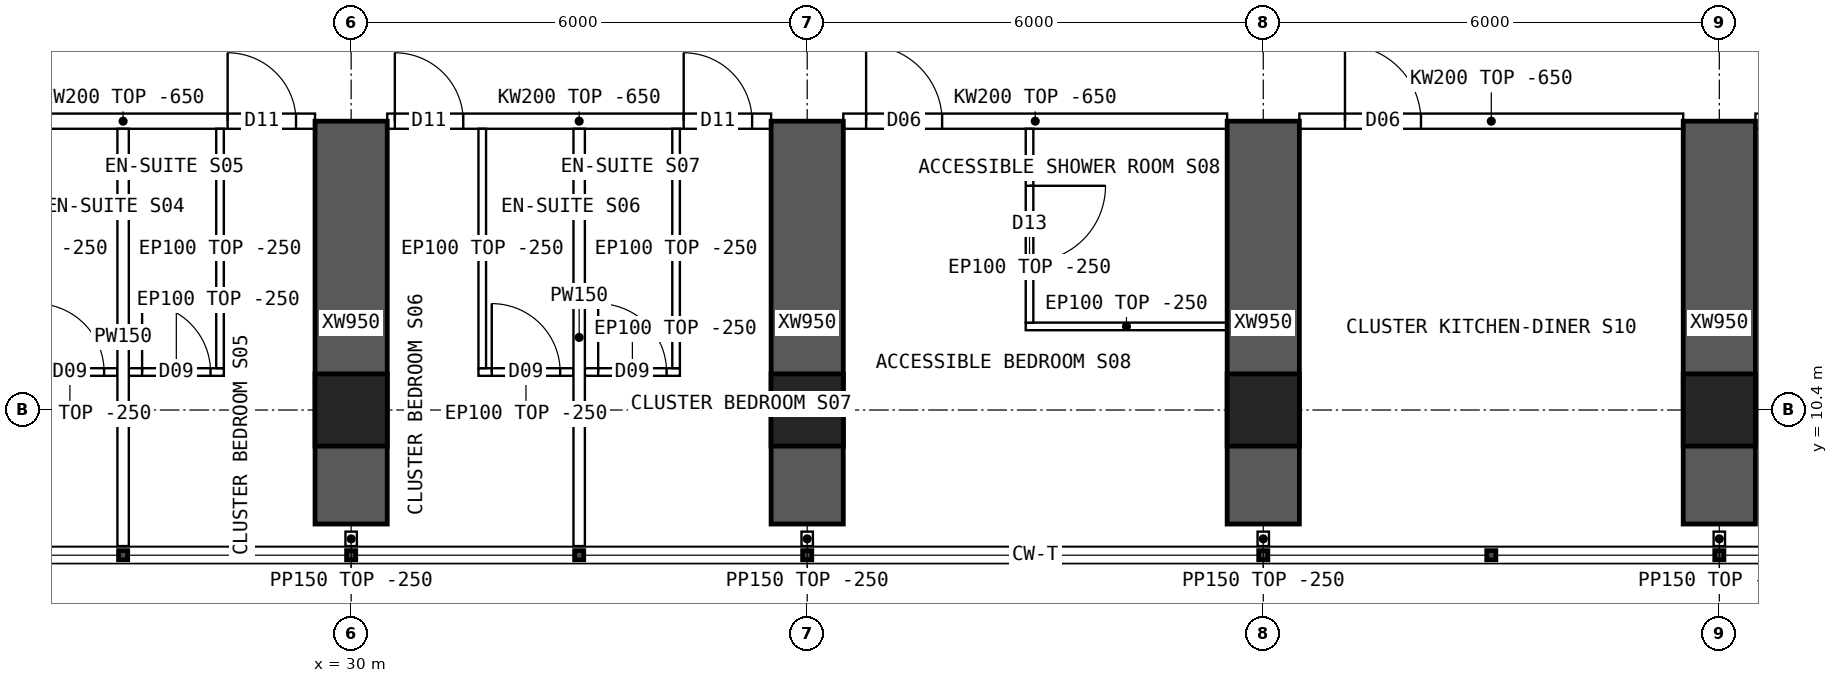
"""IFC4 building model, lengths in metres.
Left out: names, types, materials, properties, quantities, classifications, styles, units other than length and angle.
Written with IfcOpenShell. Run it as: python <this file> out.ifc"""

import sys

from ifc_helpers import new_model, si_unit, direction, frame, frame_2d, origin, origin_2d, place, context, subcontext, project, spatial, polyline, rectangle, hollow_rectangle, outline, extrude, element, fill, save


model = new_model("IFC4")
c1 = context("Model", 3, precision=1e-05, world=origin(), true_north=direction((0.0, 1.0)))
c2 = subcontext(c1, "Body", "Model", "MODEL_VIEW")
j1 = project(units=[si_unit("LENGTHUNIT", "METRE"), si_unit("PLANEANGLEUNIT", "RADIAN")], contexts=[c1])
p1 = place(None, origin())
s1 = spatial("IfcSite", under=j1, at=p1, CompositionType="ELEMENT")
p2 = place(p1, origin())
s2 = spatial("IfcBuilding", under=s1, at=p2, CompositionType="ELEMENT")
p3 = place(p2, frame((0.0, 0.0, 121.9)))
s3 = spatial("IfcBuildingStorey", under=s2, at=p3, CompositionType="ELEMENT", Elevation=121.9)
for number, where, z_axis, x_axis in (
    (1, (30.0, 10.4, 0.0), (0.0, 0.0, 1.0), (1.0, 0.0, 0.0)),
    (2, (36.0, 10.4, 0.0), (0.0, 0.0, 1.0), (1.0, 0.0, 0.0)),
    (3, (42.0, 10.4, 0.0), (0.0, 0.0, 1.0), (1.0, 0.0, 0.0)),
    (4, (48.0, 10.4, 0.0), (0.0, 0.0, 1.0), (1.0, 0.0, 0.0)),
):
    element("IfcColumn", number, at=place(p3, frame(where, z_axis=z_axis, x_axis=x_axis)), inside=s3, PredefinedType="COLUMN", context=c2, shape_type="SweptSolid", body=[
        extrude(hollow_rectangle(XDim=0.95, YDim=0.95, WallThickness=0.095, at=origin_2d()), origin(), (0.0, 0.0, 1.0), 3.75),
    ])
for number, where, z_axis, x_axis in (
    (5, (30.0, 8.9, 0.0), (0.0, 0.0, 1.0), (0.0, 1.0, 0.0)),
    (6, (36.0, 8.9, 0.0), (0.0, 0.0, 1.0), (0.0, 1.0, 0.0)),
    (7, (42.0, 8.9, 0.0), (0.0, 0.0, 1.0), (0.0, 1.0, 0.0)),
    (8, (48.0, 8.9, 0.0), (0.0, 0.0, 1.0), (0.0, 1.0, 0.0)),
):
    element("IfcWall", number, at=place(p3, frame(where, z_axis=z_axis, x_axis=x_axis)), inside=s3, PredefinedType="SHEAR", context=c2, shape_type="SweptSolid", body=[
        extrude(rectangle(XDim=5.3, YDim=0.95, at=frame_2d((2.65, 0.0))), origin(), (0.0, 0.0, 1.0), 3.75),
    ])
p4 = place(p3, frame((24.475, 14.2, 0.0), z_axis=(0.0, 0.0, 1.0), x_axis=(1.0, 0.0, 0.0)))
e9 = element("IfcWall", 9, at=p4, inside=s3, PredefinedType="SOLIDWALL", context=c2, shape_type="SweptSolid", body=[
    extrude(outline(polyline([(0.0, 0.0), (5.05, 0.0), (5.05, 3.1), (0.0, 3.1), (0.0, 0.0)])), frame((0.0, 0.1, 0.0), z_axis=(0.0, -1.0, 0.0), x_axis=(1.0, 0.0, 0.0)), (0.0, 0.0, 1.0), 0.2),
])
p5 = place(p4, frame((0.1, 0.0, 0.0)))
e10 = element("IfcOpeningElement", 10, at=p5, cuts=e9, PredefinedType="OPENING", context=c2, shape_type="SweptSolid", body=[
    extrude(rectangle(XDim=0.9, YDim=2.1, at=frame_2d((0.45, 1.05))), frame((0.0, 0.11, 0.0), z_axis=(0.0, -1.0, 0.0), x_axis=(1.0, 0.0, 0.0)), (0.0, 0.0, 1.0), 0.22),
])
p6 = place(p4, frame((3.9, 0.0, 0.0)))
e11 = element("IfcOpeningElement", 11, at=p6, cuts=e9, PredefinedType="OPENING", context=c2, shape_type="SweptSolid", body=[
    extrude(rectangle(XDim=0.9, YDim=2.1, at=frame_2d((0.45, 1.05))), frame((0.0, 0.11, 0.0), z_axis=(0.0, -1.0, 0.0), x_axis=(1.0, 0.0, 0.0)), (0.0, 0.0, 1.0), 0.22),
])
p7 = place(p3, frame((30.475, 14.2, 0.0), z_axis=(0.0, 0.0, 1.0), x_axis=(1.0, 0.0, 0.0)))
e12 = element("IfcWall", 12, at=p7, inside=s3, PredefinedType="SOLIDWALL", context=c2, shape_type="SweptSolid", body=[
    extrude(outline(polyline([(0.0, 0.0), (5.05, 0.0), (5.05, 3.1), (0.0, 3.1), (0.0, 0.0)])), frame((0.0, 0.1, 0.0), z_axis=(0.0, -1.0, 0.0), x_axis=(1.0, 0.0, 0.0)), (0.0, 0.0, 1.0), 0.2),
])
p8 = place(p7, frame((0.1, 0.0, 0.0)))
e13 = element("IfcOpeningElement", 13, at=p8, cuts=e12, PredefinedType="OPENING", context=c2, shape_type="SweptSolid", body=[
    extrude(rectangle(XDim=0.9, YDim=2.1, at=frame_2d((0.45, 1.05))), frame((0.0, 0.11, 0.0), z_axis=(0.0, -1.0, 0.0), x_axis=(1.0, 0.0, 0.0)), (0.0, 0.0, 1.0), 0.22),
])
p9 = place(p7, frame((3.9, 0.0, 0.0)))
e14 = element("IfcOpeningElement", 14, at=p9, cuts=e12, PredefinedType="OPENING", context=c2, shape_type="SweptSolid", body=[
    extrude(rectangle(XDim=0.9, YDim=2.1, at=frame_2d((0.45, 1.05))), frame((0.0, 0.11, 0.0), z_axis=(0.0, -1.0, 0.0), x_axis=(1.0, 0.0, 0.0)), (0.0, 0.0, 1.0), 0.22),
])
p10 = place(p3, frame((36.475, 14.2, 0.0), z_axis=(0.0, 0.0, 1.0), x_axis=(1.0, 0.0, 0.0)))
e15 = element("IfcWall", 15, at=p10, inside=s3, PredefinedType="SOLIDWALL", context=c2, shape_type="SweptSolid", body=[
    extrude(outline(polyline([(0.0, 0.0), (5.05, 0.0), (5.05, 3.1), (0.0, 3.1), (0.0, 0.0)])), frame((0.0, 0.1, 0.0), z_axis=(0.0, -1.0, 0.0), x_axis=(1.0, 0.0, 0.0)), (0.0, 0.0, 1.0), 0.2),
])
p11 = place(p10, frame((0.3, 0.0, 0.0)))
e16 = element("IfcOpeningElement", 16, at=p11, cuts=e15, PredefinedType="OPENING", context=c2, shape_type="SweptSolid", body=[
    extrude(rectangle(XDim=1.0, YDim=2.1, at=frame_2d((0.5, 1.05))), frame((0.0, 0.11, 0.0), z_axis=(0.0, -1.0, 0.0), x_axis=(1.0, 0.0, 0.0)), (0.0, 0.0, 1.0), 0.22),
])
p12 = place(p3, frame((42.475, 14.2, 0.0), z_axis=(0.0, 0.0, 1.0), x_axis=(1.0, 0.0, 0.0)))
e17 = element("IfcWall", 17, at=p12, inside=s3, PredefinedType="SOLIDWALL", context=c2, shape_type="SweptSolid", body=[
    extrude(outline(polyline([(0.0, 0.0), (5.05, 0.0), (5.05, 3.1), (0.0, 3.1), (0.0, 0.0)])), frame((0.0, 0.1, 0.0), z_axis=(0.0, -1.0, 0.0), x_axis=(1.0, 0.0, 0.0)), (0.0, 0.0, 1.0), 0.2),
])
p13 = place(p12, frame((0.6, 0.0, 0.0)))
e18 = element("IfcOpeningElement", 18, at=p13, cuts=e17, PredefinedType="OPENING", context=c2, shape_type="SweptSolid", body=[
    extrude(rectangle(XDim=1.0, YDim=2.1, at=frame_2d((0.5, 1.05))), frame((0.0, 0.11, 0.0), z_axis=(0.0, -1.0, 0.0), x_axis=(1.0, 0.0, 0.0)), (0.0, 0.0, 1.0), 0.22),
])
p14 = place(p3, frame((48.475, 14.2, 0.0), z_axis=(0.0, 0.0, 1.0), x_axis=(1.0, 0.0, 0.0)))
e19 = element("IfcWall", 19, at=p14, inside=s3, PredefinedType="SOLIDWALL", context=c2, shape_type="SweptSolid", body=[
    extrude(outline(polyline([(0.0, 0.0), (5.05, 0.0), (5.05, 3.1), (0.0, 3.1), (0.0, 0.0)])), frame((0.0, 0.1, 0.0), z_axis=(0.0, -1.0, 0.0), x_axis=(1.0, 0.0, 0.0)), (0.0, 0.0, 1.0), 0.2),
])
p15 = place(p14, frame((0.1, 0.0, 0.0)))
e20 = element("IfcOpeningElement", 20, at=p15, cuts=e19, PredefinedType="OPENING", context=c2, shape_type="SweptSolid", body=[
    extrude(rectangle(XDim=0.9, YDim=2.1, at=frame_2d((0.45, 1.05))), frame((0.0, 0.11, 0.0), z_axis=(0.0, -1.0, 0.0), x_axis=(1.0, 0.0, 0.0)), (0.0, 0.0, 1.0), 0.22),
])
p16 = place(p14, frame((3.9, 0.0, 0.0)))
e21 = element("IfcOpeningElement", 21, at=p16, cuts=e19, PredefinedType="OPENING", context=c2, shape_type="SweptSolid", body=[
    extrude(rectangle(XDim=0.9, YDim=2.1, at=frame_2d((0.45, 1.05))), frame((0.0, 0.11, 0.0), z_axis=(0.0, -1.0, 0.0), x_axis=(1.0, 0.0, 0.0)), (0.0, 0.0, 1.0), 0.22),
])
p17 = place(p3, frame((27.0, 8.61, 0.0), z_axis=(0.0, 0.0, 1.0), x_axis=(0.0, 1.0, 0.0)))
e22 = element("IfcWall", 22, at=p17, inside=s3, PredefinedType="PARTITIONING", context=c2, shape_type="SweptSolid", body=[
    extrude(outline(polyline([(0.0, 0.0), (5.49, 0.0), (5.49, 3.1), (5.442, 3.1), (5.44, 3.5), (1.992, 3.5), (1.99, 3.1), (1.592, 3.1), (1.59, 3.5), (0.0, 3.5), (0.0, 0.0)])), frame((0.0, 0.075, 0.0), z_axis=(0.0, -1.0, 0.0), x_axis=(1.0, 0.0, 0.0)), (0.0, 0.0, 1.0), 0.15),
])
p18 = place(p3, frame((26.925, 10.9, 0.0), z_axis=(0.0, 0.0, 1.0), x_axis=(-1.0, 0.0, 0.0)))
e23 = element("IfcWall", 23, at=p18, inside=s3, PredefinedType="PARTITIONING", context=c2, shape_type="SweptSolid", body=[
    extrude(rectangle(XDim=1.25, YDim=0.1, at=frame_2d((0.625, 0.0))), origin(), (0.0, 0.0, 1.0), 3.5),
])
p19 = place(p18, frame((0.175, 0.0, 0.0)))
e24 = element("IfcOpeningElement", 24, at=p19, cuts=e23, PredefinedType="OPENING", context=c2, shape_type="SweptSolid", body=[
    extrude(rectangle(XDim=0.9, YDim=2.1, at=frame_2d((0.45, 1.05))), frame((0.0, 0.06, 0.0), z_axis=(0.0, -1.0, 0.0), x_axis=(1.0, 0.0, 0.0)), (0.0, 0.0, 1.0), 0.12),
])
p20 = place(p3, frame((28.325, 10.9, 0.0), z_axis=(0.0, 0.0, 1.0), x_axis=(-1.0, 0.0, 0.0)))
e25 = element("IfcWall", 25, at=p20, inside=s3, PredefinedType="PARTITIONING", context=c2, shape_type="SweptSolid", body=[
    extrude(rectangle(XDim=1.25, YDim=0.1, at=frame_2d((0.625, 0.0))), origin(), (0.0, 0.0, 1.0), 3.5),
])
p21 = place(p20, frame((0.175, 0.0, 0.0)))
e26 = element("IfcOpeningElement", 26, at=p21, cuts=e25, PredefinedType="OPENING", context=c2, shape_type="SweptSolid", body=[
    extrude(rectangle(XDim=0.9, YDim=2.1, at=frame_2d((0.45, 1.05))), frame((0.0, 0.06, 0.0), z_axis=(0.0, -1.0, 0.0), x_axis=(1.0, 0.0, 0.0)), (0.0, 0.0, 1.0), 0.12),
])
p22 = place(p3, frame((28.275, 10.95, 0.0), z_axis=(0.0, 0.0, 1.0), x_axis=(0.0, 1.0, 0.0)))
e27 = element("IfcWall", 27, at=p22, inside=s3, PredefinedType="PARTITIONING", context=c2, shape_type="SweptSolid", body=[
    extrude(outline(polyline([(0.0, 0.0), (3.15, 0.0), (3.15, 3.1), (3.102, 3.1), (3.1, 3.5), (0.0, 3.5), (0.0, 0.0)])), frame((0.0, 0.05, 0.0), z_axis=(0.0, -1.0, 0.0), x_axis=(1.0, 0.0, 0.0)), (0.0, 0.0, 1.0), 0.1),
])
p23 = place(p3, frame((33.0, 8.61, 0.0), z_axis=(0.0, 0.0, 1.0), x_axis=(0.0, 1.0, 0.0)))
e28 = element("IfcWall", 28, at=p23, inside=s3, PredefinedType="PARTITIONING", context=c2, shape_type="SweptSolid", body=[
    extrude(outline(polyline([(0.0, 0.0), (5.49, 0.0), (5.49, 3.1), (5.442, 3.1), (5.44, 3.5), (1.992, 3.5), (1.99, 3.1), (1.592, 3.1), (1.59, 3.5), (0.0, 3.5), (0.0, 0.0)])), frame((0.0, 0.075, 0.0), z_axis=(0.0, -1.0, 0.0), x_axis=(1.0, 0.0, 0.0)), (0.0, 0.0, 1.0), 0.15),
])
p24 = place(p3, frame((32.925, 10.9, 0.0), z_axis=(0.0, 0.0, 1.0), x_axis=(-1.0, 0.0, 0.0)))
e29 = element("IfcWall", 29, at=p24, inside=s3, PredefinedType="PARTITIONING", context=c2, shape_type="SweptSolid", body=[
    extrude(rectangle(XDim=1.25, YDim=0.1, at=frame_2d((0.625, 0.0))), origin(), (0.0, 0.0, 1.0), 3.5),
])
p25 = place(p24, frame((0.175, 0.0, 0.0)))
e30 = element("IfcOpeningElement", 30, at=p25, cuts=e29, PredefinedType="OPENING", context=c2, shape_type="SweptSolid", body=[
    extrude(rectangle(XDim=0.9, YDim=2.1, at=frame_2d((0.45, 1.05))), frame((0.0, 0.06, 0.0), z_axis=(0.0, -1.0, 0.0), x_axis=(1.0, 0.0, 0.0)), (0.0, 0.0, 1.0), 0.12),
])
p26 = place(p3, frame((31.725, 10.95, 0.0), z_axis=(0.0, 0.0, 1.0), x_axis=(0.0, 1.0, 0.0)))
e31 = element("IfcWall", 31, at=p26, inside=s3, PredefinedType="PARTITIONING", context=c2, shape_type="SweptSolid", body=[
    extrude(outline(polyline([(0.0, 0.0), (3.15, 0.0), (3.15, 3.1), (3.102, 3.1), (3.1, 3.5), (0.0, 3.5), (0.0, 0.0)])), frame((0.0, 0.05, 0.0), z_axis=(0.0, -1.0, 0.0), x_axis=(1.0, 0.0, 0.0)), (0.0, 0.0, 1.0), 0.1),
])
p27 = place(p3, frame((34.325, 10.9, 0.0), z_axis=(0.0, 0.0, 1.0), x_axis=(-1.0, 0.0, 0.0)))
e32 = element("IfcWall", 32, at=p27, inside=s3, PredefinedType="PARTITIONING", context=c2, shape_type="SweptSolid", body=[
    extrude(rectangle(XDim=1.25, YDim=0.1, at=frame_2d((0.625, 0.0))), origin(), (0.0, 0.0, 1.0), 3.5),
])
p28 = place(p27, frame((0.175, 0.0, 0.0)))
e33 = element("IfcOpeningElement", 33, at=p28, cuts=e32, PredefinedType="OPENING", context=c2, shape_type="SweptSolid", body=[
    extrude(rectangle(XDim=0.9, YDim=2.1, at=frame_2d((0.45, 1.05))), frame((0.0, 0.06, 0.0), z_axis=(0.0, -1.0, 0.0), x_axis=(1.0, 0.0, 0.0)), (0.0, 0.0, 1.0), 0.12),
])
p29 = place(p3, frame((34.275, 10.95, 0.0), z_axis=(0.0, 0.0, 1.0), x_axis=(0.0, 1.0, 0.0)))
e34 = element("IfcWall", 34, at=p29, inside=s3, PredefinedType="PARTITIONING", context=c2, shape_type="SweptSolid", body=[
    extrude(outline(polyline([(0.0, 0.0), (3.15, 0.0), (3.15, 3.1), (3.102, 3.1), (3.1, 3.5), (0.0, 3.5), (0.0, 0.0)])), frame((0.0, 0.05, 0.0), z_axis=(0.0, -1.0, 0.0), x_axis=(1.0, 0.0, 0.0)), (0.0, 0.0, 1.0), 0.1),
])
p30 = place(p3, frame((38.875, 11.5, 0.0), z_axis=(0.0, 0.0, 1.0), x_axis=(1.0, 0.0, 0.0)))
e35 = element("IfcWall", 35, at=p30, inside=s3, PredefinedType="PARTITIONING", context=c2, shape_type="SweptSolid", body=[
    extrude(rectangle(XDim=2.65, YDim=0.1, at=frame_2d((1.325, 0.0))), origin(), (0.0, 0.0, 1.0), 3.5),
])
p31 = place(p3, frame((38.925, 11.55, 0.0), z_axis=(0.0, 0.0, 1.0), x_axis=(0.0, 1.0, 0.0)))
e36 = element("IfcWall", 36, at=p31, inside=s3, PredefinedType="PARTITIONING", context=c2, shape_type="SweptSolid", body=[
    extrude(outline(polyline([(0.0, 0.0), (2.55, 0.0), (2.55, 3.1), (2.502, 3.1), (2.5, 3.5), (0.0, 3.5), (0.0, 0.0)])), frame((0.0, 0.05, 0.0), z_axis=(0.0, -1.0, 0.0), x_axis=(1.0, 0.0, 0.0)), (0.0, 0.0, 1.0), 0.1),
])
p32 = place(p31, frame((0.8, 0.0, 0.0)))
e37 = element("IfcOpeningElement", 37, at=p32, cuts=e36, PredefinedType="OPENING", context=c2, shape_type="SweptSolid", body=[
    extrude(rectangle(XDim=1.0, YDim=2.1, at=frame_2d((0.5, 1.05))), frame((0.0, 0.06, 0.0), z_axis=(0.0, -1.0, 0.0), x_axis=(1.0, 0.0, 0.0)), (0.0, 0.0, 1.0), 0.12),
])
for number, where, z_axis, x_axis in (
    (38, (30.0, 8.8, 0.0), (0.0, 0.0, 1.0), (0.0, -1.0, 0.0)),
    (39, (36.0, 8.8, 0.0), (0.0, 0.0, 1.0), (0.0, -1.0, 0.0)),
    (40, (42.0, 8.8, 0.0), (0.0, 0.0, 1.0), (0.0, -1.0, 0.0)),
    (41, (48.0, 8.8, 0.0), (0.0, 0.0, 1.0), (0.0, -1.0, 0.0)),
):
    element("IfcWall", number, at=place(p3, frame(where, z_axis=z_axis, x_axis=x_axis)), inside=s3, PredefinedType="PARTITIONING", context=c2, shape_type="SweptSolid", body=[
        extrude(rectangle(XDim=0.19, YDim=0.15, at=frame_2d((0.095, 0.0))), origin(), (0.0, 0.0, 1.0), 3.5),
    ])
p33 = place(p19, origin())
e42 = element("IfcDoor", 42, at=p33, inside=s3, OperationType="SINGLE_SWING_RIGHT", PredefinedType="DOOR", context=c2, shape_type="SweptSolid", body=[
    extrude(rectangle(XDim=0.9, YDim=2.1, at=frame_2d((0.45, 1.05))), frame((0.0, 0.025, 0.0), z_axis=(0.0, -1.0, 0.0), x_axis=(1.0, 0.0, 0.0)), (0.0, 0.0, 1.0), 0.05),
])
fill(e24, e42)
p34 = place(p21, origin())
e43 = element("IfcDoor", 43, at=p34, inside=s3, OperationType="SINGLE_SWING_RIGHT", PredefinedType="DOOR", context=c2, shape_type="SweptSolid", body=[
    extrude(rectangle(XDim=0.9, YDim=2.1, at=frame_2d((0.45, 1.05))), frame((0.0, 0.025, 0.0), z_axis=(0.0, -1.0, 0.0), x_axis=(1.0, 0.0, 0.0)), (0.0, 0.0, 1.0), 0.05),
])
fill(e26, e43)
p35 = place(p6, origin())
e44 = element("IfcDoor", 44, at=p35, inside=s3, OperationType="SINGLE_SWING_LEFT", PredefinedType="DOOR", context=c2, shape_type="SweptSolid", body=[
    extrude(rectangle(XDim=0.9, YDim=2.1, at=frame_2d((0.45, 1.05))), frame((0.0, 0.025, 0.0), z_axis=(0.0, -1.0, 0.0), x_axis=(1.0, 0.0, 0.0)), (0.0, 0.0, 1.0), 0.05),
])
fill(e11, e44)
p36 = place(p25, origin())
e45 = element("IfcDoor", 45, at=p36, inside=s3, OperationType="SINGLE_SWING_RIGHT", PredefinedType="DOOR", context=c2, shape_type="SweptSolid", body=[
    extrude(rectangle(XDim=0.9, YDim=2.1, at=frame_2d((0.45, 1.05))), frame((0.0, 0.025, 0.0), z_axis=(0.0, -1.0, 0.0), x_axis=(1.0, 0.0, 0.0)), (0.0, 0.0, 1.0), 0.05),
])
fill(e30, e45)
p37 = place(p8, origin())
e46 = element("IfcDoor", 46, at=p37, inside=s3, OperationType="SINGLE_SWING_LEFT", PredefinedType="DOOR", context=c2, shape_type="SweptSolid", body=[
    extrude(rectangle(XDim=0.9, YDim=2.1, at=frame_2d((0.45, 1.05))), frame((0.0, 0.025, 0.0), z_axis=(0.0, -1.0, 0.0), x_axis=(1.0, 0.0, 0.0)), (0.0, 0.0, 1.0), 0.05),
])
fill(e13, e46)
p38 = place(p28, origin())
e47 = element("IfcDoor", 47, at=p38, inside=s3, OperationType="SINGLE_SWING_RIGHT", PredefinedType="DOOR", context=c2, shape_type="SweptSolid", body=[
    extrude(rectangle(XDim=0.9, YDim=2.1, at=frame_2d((0.45, 1.05))), frame((0.0, 0.025, 0.0), z_axis=(0.0, -1.0, 0.0), x_axis=(1.0, 0.0, 0.0)), (0.0, 0.0, 1.0), 0.05),
])
fill(e33, e47)
p39 = place(p9, origin())
e48 = element("IfcDoor", 48, at=p39, inside=s3, OperationType="SINGLE_SWING_LEFT", PredefinedType="DOOR", context=c2, shape_type="SweptSolid", body=[
    extrude(rectangle(XDim=0.9, YDim=2.1, at=frame_2d((0.45, 1.05))), frame((0.0, 0.025, 0.0), z_axis=(0.0, -1.0, 0.0), x_axis=(1.0, 0.0, 0.0)), (0.0, 0.0, 1.0), 0.05),
])
fill(e14, e48)
p40 = place(p32, origin())
e49 = element("IfcDoor", 49, at=p40, inside=s3, OperationType="SINGLE_SWING_RIGHT", PredefinedType="DOOR", context=c2, shape_type="SweptSolid", body=[
    extrude(rectangle(XDim=1.0, YDim=2.1, at=frame_2d((0.5, 1.05))), frame((0.0, 0.025, 0.0), z_axis=(0.0, -1.0, 0.0), x_axis=(1.0, 0.0, 0.0)), (0.0, 0.0, 1.0), 0.05),
])
fill(e37, e49)
p41 = place(p11, origin())
e50 = element("IfcDoor", 50, at=p41, inside=s3, OperationType="SINGLE_SWING_LEFT", PredefinedType="DOOR", context=c2, shape_type="SweptSolid", body=[
    extrude(rectangle(XDim=1.0, YDim=2.1, at=frame_2d((0.5, 1.05))), frame((0.0, 0.025, 0.0), z_axis=(0.0, -1.0, 0.0), x_axis=(1.0, 0.0, 0.0)), (0.0, 0.0, 1.0), 0.05),
])
fill(e16, e50)
p42 = place(p13, origin())
e51 = element("IfcDoor", 51, at=p42, inside=s3, OperationType="SINGLE_SWING_LEFT", PredefinedType="DOOR", context=c2, shape_type="SweptSolid", body=[
    extrude(rectangle(XDim=1.0, YDim=2.1, at=frame_2d((0.5, 1.05))), frame((0.0, 0.025, 0.0), z_axis=(0.0, -1.0, 0.0), x_axis=(1.0, 0.0, 0.0)), (0.0, 0.0, 1.0), 0.05),
])
fill(e18, e51)
save(model, sys.argv[1])
